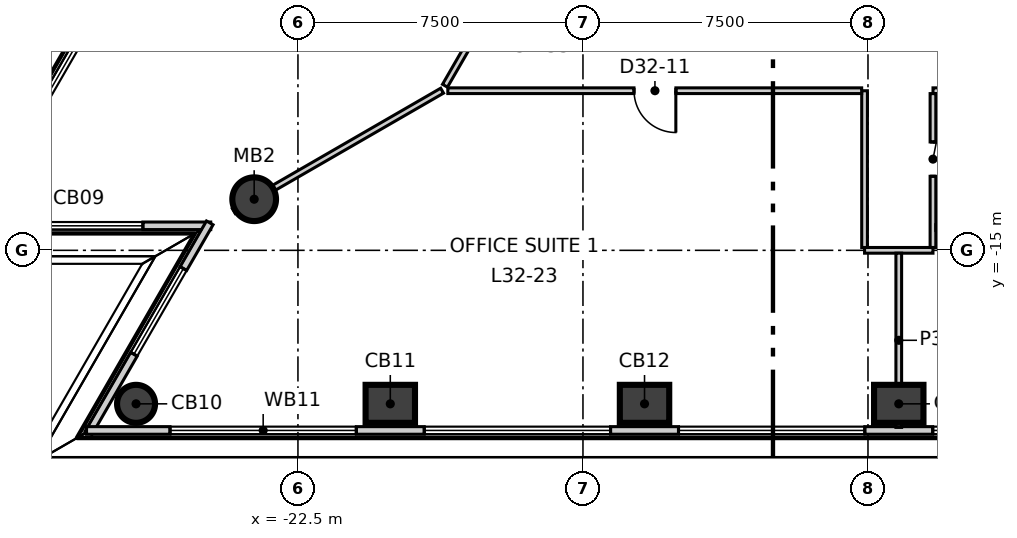
"""IFC4 building model, lengths in metres.
Left out: names, types, materials, properties, quantities, classifications, styles, units other than length and angle.
Written with IfcOpenShell. Run it as: python <this file> out.ifc"""

import sys

from ifc_helpers import new_model, si_unit, direction, frame, frame_2d, origin, origin_2d, place, context, subcontext, project, spatial, rectangle, circle, extrude, element, fill, save


model = new_model("IFC4")
c1 = context("Model", 3, precision=1e-05, world=origin(), true_north=direction((0.0, 1.0)))
c2 = subcontext(c1, "Body", "Model", "MODEL_VIEW")
j1 = project(units=[si_unit("LENGTHUNIT", "METRE"), si_unit("PLANEANGLEUNIT", "RADIAN")], contexts=[c1])
p1 = place(None, origin())
s1 = spatial("IfcSite", under=j1, at=p1, CompositionType="ELEMENT")
p2 = place(p1, origin())
s2 = spatial("IfcBuilding", under=s1, at=p2, CompositionType="ELEMENT")
p3 = place(p2, frame((0.0, 0.0, 140.3)))
s3 = spatial("IfcBuildingStorey", under=s2, at=p3, CompositionType="ELEMENT", Elevation=140.3)
p4 = place(p3, frame((-26.76, -19.039, -0.3), z_axis=(0.0, 0.0, 1.0), x_axis=(1.0, 0.0, 0.0)))
e1 = element("IfcColumn", 1, at=p4, inside=s3, PredefinedType="COLUMN", context=c2, shape_type="SweptSolid", body=[
    extrude(circle(Radius=0.5, at=origin_2d()), origin(), (0.0, 0.0, 1.0), 4.0),
])
for number, where, z_axis, x_axis in (
    (2, (-20.07, -19.039, -0.3), (0.0, 0.0, 1.0), (1.0, 0.0, 0.0)),
    (3, (-13.38, -19.039, -0.3), (0.0, 0.0, 1.0), (1.0, 0.0, 0.0)),
    (4, (-6.69, -19.039, -0.3), (0.0, 0.0, 1.0), (1.0, 0.0, 0.0)),
):
    element("IfcColumn", number, at=place(p3, frame(where, z_axis=z_axis, x_axis=x_axis)), inside=s3, PredefinedType="COLUMN", context=c2, shape_type="SweptSolid", body=[
        extrude(rectangle(XDim=1.3, YDim=1.0, at=origin_2d()), origin(), (0.0, 0.0, 1.0), 4.0),
    ])
p5 = place(p3, frame((-23.652, -13.655, -0.3), z_axis=(0.0, 0.0, 1.0), x_axis=(1.0, 0.0, 0.0)))
e5 = element("IfcColumn", 5, at=p5, inside=s3, PredefinedType="COLUMN", context=c2, shape_type="SweptSolid", body=[
    extrude(circle(Radius=0.575, at=origin_2d()), origin(), (0.0, 0.0, 1.0), 4.0),
])
p6 = place(p3, frame((-3.063, 34.172, 0.0), z_axis=(0.0, 0.0, 1.0), x_axis=(-0.500008098571, -0.866020728022, 0.0)))
e6 = element("IfcWall", 6, at=p6, inside=s3, PredefinedType="ELEMENTEDWALL", context=c2, shape_type="SweptSolid", body=[
    extrude(rectangle(XDim=56.105, YDim=0.2, at=frame_2d((28.052, 0.0))), origin(), (0.0, 0.0, 1.0), 3.7),
])
p7 = place(p6, frame((2.197, 0.0, 0.9)))
e7 = element("IfcOpeningElement", 7, at=p7, cuts=e6, PredefinedType="OPENING", context=c2, shape_type="SweptSolid", body=[
    extrude(rectangle(XDim=4.9, YDim=2.5, at=frame_2d((2.45, 1.25))), frame((0.0, 0.11, 0.0), z_axis=(0.0, -1.0, 0.0), x_axis=(1.0, 0.0, 0.0)), (0.0, 0.0, 1.0), 0.22),
])
p8 = place(p6, frame((8.887, 0.0, 0.9)))
e8 = element("IfcOpeningElement", 8, at=p8, cuts=e6, PredefinedType="OPENING", context=c2, shape_type="SweptSolid", body=[
    extrude(rectangle(XDim=4.9, YDim=2.5, at=frame_2d((2.45, 1.25))), frame((0.0, 0.11, 0.0), z_axis=(0.0, -1.0, 0.0), x_axis=(1.0, 0.0, 0.0)), (0.0, 0.0, 1.0), 0.22),
])
p9 = place(p6, frame((15.577, 0.0, 0.9)))
e9 = element("IfcOpeningElement", 9, at=p9, cuts=e6, PredefinedType="OPENING", context=c2, shape_type="SweptSolid", body=[
    extrude(rectangle(XDim=4.9, YDim=2.5, at=frame_2d((2.45, 1.25))), frame((0.0, 0.11, 0.0), z_axis=(0.0, -1.0, 0.0), x_axis=(1.0, 0.0, 0.0)), (0.0, 0.0, 1.0), 0.22),
])
p10 = place(p6, frame((22.267, 0.0, 0.9)))
e10 = element("IfcOpeningElement", 10, at=p10, cuts=e6, PredefinedType="OPENING", context=c2, shape_type="SweptSolid", body=[
    extrude(rectangle(XDim=4.9, YDim=2.5, at=frame_2d((2.45, 1.25))), frame((0.0, 0.11, 0.0), z_axis=(0.0, -1.0, 0.0), x_axis=(1.0, 0.0, 0.0)), (0.0, 0.0, 1.0), 0.22),
])
p11 = place(p6, frame((28.957, 0.0, 0.9)))
e11 = element("IfcOpeningElement", 11, at=p11, cuts=e6, PredefinedType="OPENING", context=c2, shape_type="SweptSolid", body=[
    extrude(rectangle(XDim=4.9, YDim=2.5, at=frame_2d((2.45, 1.25))), frame((0.0, 0.11, 0.0), z_axis=(0.0, -1.0, 0.0), x_axis=(1.0, 0.0, 0.0)), (0.0, 0.0, 1.0), 0.22),
])
p12 = place(p6, frame((35.647, 0.0, 0.9)))
e12 = element("IfcOpeningElement", 12, at=p12, cuts=e6, PredefinedType="OPENING", context=c2, shape_type="SweptSolid", body=[
    extrude(rectangle(XDim=4.9, YDim=2.5, at=frame_2d((2.45, 1.25))), frame((0.0, 0.11, 0.0), z_axis=(0.0, -1.0, 0.0), x_axis=(1.0, 0.0, 0.0)), (0.0, 0.0, 1.0), 0.22),
])
p13 = place(p6, frame((42.337, 0.0, 0.9)))
e13 = element("IfcOpeningElement", 13, at=p13, cuts=e6, PredefinedType="OPENING", context=c2, shape_type="SweptSolid", body=[
    extrude(rectangle(XDim=4.9, YDim=2.5, at=frame_2d((2.45, 1.25))), frame((0.0, 0.11, 0.0), z_axis=(0.0, -1.0, 0.0), x_axis=(1.0, 0.0, 0.0)), (0.0, 0.0, 1.0), 0.22),
])
p14 = place(p6, frame((49.027, 0.0, 0.9)))
e14 = element("IfcOpeningElement", 14, at=p14, cuts=e6, PredefinedType="OPENING", context=c2, shape_type="SweptSolid", body=[
    extrude(rectangle(XDim=4.9, YDim=2.5, at=frame_2d((2.45, 1.25))), frame((0.0, 0.11, 0.0), z_axis=(0.0, -1.0, 0.0), x_axis=(1.0, 0.0, 0.0)), (0.0, 0.0, 1.0), 0.22),
])
p15 = place(p3, frame((-31.171, -14.355, 0.0), z_axis=(0.0, 0.0, 1.0), x_axis=(1.0, 0.0, 0.0)))
e15 = element("IfcWall", 15, at=p15, inside=s3, PredefinedType="ELEMENTEDWALL", context=c2, shape_type="SweptSolid", body=[
    extrude(rectangle(XDim=6.376, YDim=0.2, at=frame_2d((3.188, 0.0))), origin(), (0.0, 0.0, 1.0), 3.7),
])
p16 = place(p15, frame((1.99, 0.0, 0.9)))
e16 = element("IfcOpeningElement", 16, at=p16, cuts=e15, PredefinedType="OPENING", context=c2, shape_type="SweptSolid", body=[
    extrude(rectangle(XDim=2.6, YDim=2.5, at=frame_2d((1.3, 1.25))), frame((0.0, 0.11, 0.0), z_axis=(0.0, -1.0, 0.0), x_axis=(1.0, 0.0, 0.0)), (0.0, 0.0, 1.0), 0.22),
])
p17 = place(p3, frame((-24.82, -14.277, 0.0), z_axis=(0.0, 0.0, 1.0), x_axis=(-0.499919089554, -0.866072112413, 0.0)))
e17 = element("IfcWall", 17, at=p17, inside=s3, PredefinedType="ELEMENTEDWALL", context=c2, shape_type="SweptSolid", body=[
    extrude(rectangle(XDim=6.377, YDim=0.2, at=frame_2d((3.188, 0.0))), origin(), (0.0, 0.0, 1.0), 3.7),
])
p18 = place(p17, frame((1.39, 0.0, 0.9)))
e18 = element("IfcOpeningElement", 18, at=p18, cuts=e17, PredefinedType="OPENING", context=c2, shape_type="SweptSolid", body=[
    extrude(rectangle(XDim=2.6, YDim=2.5, at=frame_2d((1.3, 1.25))), frame((0.0, 0.11, 0.0), z_axis=(0.0, -1.0, 0.0), x_axis=(1.0, 0.0, 0.0)), (0.0, 0.0, 1.0), 0.22),
])
p19 = place(p3, frame((-28.063, -19.739, 0.0), z_axis=(0.0, 0.0, 1.0), x_axis=(1.0, 0.0, 0.0)))
e19 = element("IfcWall", 19, at=p19, inside=s3, PredefinedType="ELEMENTEDWALL", context=c2, shape_type="SweptSolid", body=[
    extrude(rectangle(XDim=56.106, YDim=0.2, at=frame_2d((28.053, 0.0))), origin(), (0.0, 0.0, 1.0), 3.7),
])
p20 = place(p19, frame((2.198, 0.0, 0.9)))
e20 = element("IfcOpeningElement", 20, at=p20, cuts=e19, PredefinedType="OPENING", context=c2, shape_type="SweptSolid", body=[
    extrude(rectangle(XDim=4.9, YDim=2.5, at=frame_2d((2.45, 1.25))), frame((0.0, 0.11, 0.0), z_axis=(0.0, -1.0, 0.0), x_axis=(1.0, 0.0, 0.0)), (0.0, 0.0, 1.0), 0.22),
])
p21 = place(p19, frame((8.888, 0.0, 0.9)))
e21 = element("IfcOpeningElement", 21, at=p21, cuts=e19, PredefinedType="OPENING", context=c2, shape_type="SweptSolid", body=[
    extrude(rectangle(XDim=4.9, YDim=2.5, at=frame_2d((2.45, 1.25))), frame((0.0, 0.11, 0.0), z_axis=(0.0, -1.0, 0.0), x_axis=(1.0, 0.0, 0.0)), (0.0, 0.0, 1.0), 0.22),
])
p22 = place(p19, frame((15.578, 0.0, 0.9)))
e22 = element("IfcOpeningElement", 22, at=p22, cuts=e19, PredefinedType="OPENING", context=c2, shape_type="SweptSolid", body=[
    extrude(rectangle(XDim=4.9, YDim=2.5, at=frame_2d((2.45, 1.25))), frame((0.0, 0.11, 0.0), z_axis=(0.0, -1.0, 0.0), x_axis=(1.0, 0.0, 0.0)), (0.0, 0.0, 1.0), 0.22),
])
p23 = place(p19, frame((22.268, 0.0, 0.9)))
e23 = element("IfcOpeningElement", 23, at=p23, cuts=e19, PredefinedType="OPENING", context=c2, shape_type="SweptSolid", body=[
    extrude(rectangle(XDim=4.9, YDim=2.5, at=frame_2d((2.45, 1.25))), frame((0.0, 0.11, 0.0), z_axis=(0.0, -1.0, 0.0), x_axis=(1.0, 0.0, 0.0)), (0.0, 0.0, 1.0), 0.22),
])
p24 = place(p19, frame((28.958, 0.0, 0.9)))
e24 = element("IfcOpeningElement", 24, at=p24, cuts=e19, PredefinedType="OPENING", context=c2, shape_type="SweptSolid", body=[
    extrude(rectangle(XDim=4.9, YDim=2.5, at=frame_2d((2.45, 1.25))), frame((0.0, 0.11, 0.0), z_axis=(0.0, -1.0, 0.0), x_axis=(1.0, 0.0, 0.0)), (0.0, 0.0, 1.0), 0.22),
])
p25 = place(p19, frame((35.648, 0.0, 0.9)))
e25 = element("IfcOpeningElement", 25, at=p25, cuts=e19, PredefinedType="OPENING", context=c2, shape_type="SweptSolid", body=[
    extrude(rectangle(XDim=4.9, YDim=2.5, at=frame_2d((2.45, 1.25))), frame((0.0, 0.11, 0.0), z_axis=(0.0, -1.0, 0.0), x_axis=(1.0, 0.0, 0.0)), (0.0, 0.0, 1.0), 0.22),
])
p26 = place(p19, frame((42.338, 0.0, 0.9)))
e26 = element("IfcOpeningElement", 26, at=p26, cuts=e19, PredefinedType="OPENING", context=c2, shape_type="SweptSolid", body=[
    extrude(rectangle(XDim=4.9, YDim=2.5, at=frame_2d((2.45, 1.25))), frame((0.0, 0.11, 0.0), z_axis=(0.0, -1.0, 0.0), x_axis=(1.0, 0.0, 0.0)), (0.0, 0.0, 1.0), 0.22),
])
p27 = place(p19, frame((49.028, 0.0, 0.9)))
e27 = element("IfcOpeningElement", 27, at=p27, cuts=e19, PredefinedType="OPENING", context=c2, shape_type="SweptSolid", body=[
    extrude(rectangle(XDim=4.9, YDim=2.5, at=frame_2d((2.45, 1.25))), frame((0.0, 0.11, 0.0), z_axis=(0.0, -1.0, 0.0), x_axis=(1.0, 0.0, 0.0)), (0.0, 0.0, 1.0), 0.22),
])
p28 = place(p3, frame((-24.189, -13.965, 0.0), z_axis=(0.0, 0.0, 1.0), x_axis=(0.865994217434, 0.500054012454, 0.0)))
e28 = element("IfcWall", 28, at=p28, inside=s3, PredefinedType="PARTITIONING", context=c2, shape_type="SweptSolid", body=[
    extrude(rectangle(XDim=6.331, YDim=0.15, at=frame_2d((3.166, 0.0))), origin(), (0.0, 0.0, 1.0), 3.15),
])
p29 = place(p3, frame((-7.59, -15.0, 0.0), z_axis=(0.0, 0.0, 1.0), x_axis=(1.0, 0.0, 0.0)))
e29 = element("IfcWall", 29, at=p29, inside=s3, PredefinedType="PARTITIONING", context=c2, shape_type="SweptSolid", body=[
    extrude(rectangle(XDim=1.8, YDim=0.15, at=frame_2d((0.9, 0.0))), origin(), (0.0, 0.0, 1.0), 3.7),
])
p30 = place(p3, frame((-7.59, -14.925, 0.0), z_axis=(0.0, 0.0, 1.0), x_axis=(0.0, 1.0, 0.0)))
e30 = element("IfcWall", 30, at=p30, inside=s3, PredefinedType="PARTITIONING", context=c2, shape_type="SweptSolid", body=[
    extrude(rectangle(XDim=4.124, YDim=0.15, at=frame_2d((2.062, 0.0))), origin(), (0.0, 0.0, 1.0), 3.7),
])
p31 = place(p3, frame((-18.556, -10.8, 0.0), z_axis=(0.0, 0.0, 1.0), x_axis=(1.0, 0.0, 0.0)))
e31 = element("IfcWall", 31, at=p31, inside=s3, PredefinedType="PARTITIONING", context=c2, shape_type="SweptSolid", body=[
    extrude(rectangle(XDim=10.89, YDim=0.15, at=frame_2d((5.445, 0.0))), origin(), (0.0, 0.0, 1.0), 3.7),
])
p32 = place(p31, frame((4.9, 0.0, 0.0)))
e32 = element("IfcOpeningElement", 32, at=p32, cuts=e31, PredefinedType="OPENING", context=c2, shape_type="SweptSolid", body=[
    extrude(rectangle(XDim=1.1, YDim=2.1, at=frame_2d((0.55, 1.05))), frame((0.0, 0.085, 0.0), z_axis=(0.0, -1.0, 0.0), x_axis=(1.0, 0.0, 0.0)), (0.0, 0.0, 1.0), 0.17),
])
p33 = place(p3, frame((-5.789, -10.8, 0.0), z_axis=(0.0, 0.0, 1.0), x_axis=(1.0, 0.0, 0.0)))
e33 = element("IfcWall", 33, at=p33, inside=s3, PredefinedType="PARTITIONING", context=c2, shape_type="SweptSolid", body=[
    extrude(rectangle(XDim=24.495, YDim=0.15, at=frame_2d((12.248, 0.0))), origin(), (0.0, 0.0, 1.0), 3.7),
])
p34 = place(p33, frame((10.049, 0.0, 0.0)))
e34 = element("IfcOpeningElement", 34, at=p34, cuts=e33, PredefinedType="OPENING", context=c2, shape_type="SweptSolid", body=[
    extrude(rectangle(XDim=1.1, YDim=2.1, at=frame_2d((0.55, 1.05))), frame((0.0, 0.085, 0.0), z_axis=(0.0, -1.0, 0.0), x_axis=(1.0, 0.0, 0.0)), (0.0, 0.0, 1.0), 0.17),
])
p35 = place(p33, frame((4.349, 0.0, 0.0)))
e35 = element("IfcOpeningElement", 35, at=p35, cuts=e33, PredefinedType="OPENING", context=c2, shape_type="SweptSolid", body=[
    extrude(rectangle(XDim=0.9, YDim=2.1, at=frame_2d((0.45, 1.05))), frame((0.0, 0.085, 0.0), z_axis=(0.0, -1.0, 0.0), x_axis=(1.0, 0.0, 0.0)), (0.0, 0.0, 1.0), 0.17),
])
p36 = place(p33, frame((7.149, 0.0, 0.0)))
e36 = element("IfcOpeningElement", 36, at=p36, cuts=e33, PredefinedType="OPENING", context=c2, shape_type="SweptSolid", body=[
    extrude(rectangle(XDim=1.0, YDim=2.1, at=frame_2d((0.5, 1.05))), frame((0.0, 0.085, 0.0), z_axis=(0.0, -1.0, 0.0), x_axis=(1.0, 0.0, 0.0)), (0.0, 0.0, 1.0), 0.17),
])
p37 = place(p33, frame((17.929, 0.0, 0.0)))
e37 = element("IfcOpeningElement", 37, at=p37, cuts=e33, PredefinedType="OPENING", context=c2, shape_type="SweptSolid", body=[
    extrude(rectangle(XDim=1.1, YDim=2.1, at=frame_2d((0.55, 1.05))), frame((0.0, 0.085, 0.0), z_axis=(0.0, -1.0, 0.0), x_axis=(1.0, 0.0, 0.0)), (0.0, 0.0, 1.0), 0.17),
])
p38 = place(p3, frame((-18.631, -10.669, 0.0), z_axis=(0.0, 0.0, 1.0), x_axis=(0.50004165882, 0.866001350717, 0.0)))
e38 = element("IfcWall", 38, at=p38, inside=s3, PredefinedType="PARTITIONING", context=c2, shape_type="SweptSolid", body=[
    extrude(rectangle(XDim=17.655, YDim=0.15, at=frame_2d((8.827, 0.0))), origin(), (0.0, 0.0, 1.0), 3.7),
])
p39 = place(p38, frame((10.206, 0.0, 0.0)))
e39 = element("IfcOpeningElement", 39, at=p39, cuts=e38, PredefinedType="OPENING", context=c2, shape_type="SweptSolid", body=[
    extrude(rectangle(XDim=1.1, YDim=2.1, at=frame_2d((0.55, 1.05))), frame((0.0, 0.085, 0.0), z_axis=(0.0, -1.0, 0.0), x_axis=(1.0, 0.0, 0.0)), (0.0, 0.0, 1.0), 0.17),
])
p40 = place(p38, frame((12.406, 0.0, 0.0)))
e40 = element("IfcOpeningElement", 40, at=p40, cuts=e38, PredefinedType="OPENING", context=c2, shape_type="SweptSolid", body=[
    extrude(rectangle(XDim=0.9, YDim=2.1, at=frame_2d((0.45, 1.05))), frame((0.0, 0.085, 0.0), z_axis=(0.0, -1.0, 0.0), x_axis=(1.0, 0.0, 0.0)), (0.0, 0.0, 1.0), 0.17),
])
p41 = place(p38, frame((1.925, 0.0, 0.0)))
e41 = element("IfcOpeningElement", 41, at=p41, cuts=e38, PredefinedType="OPENING", context=c2, shape_type="SweptSolid", body=[
    extrude(rectangle(XDim=1.1, YDim=2.1, at=frame_2d((0.55, 1.05))), frame((0.0, 0.085, 0.0), z_axis=(0.0, -1.0, 0.0), x_axis=(1.0, 0.0, 0.0)), (0.0, 0.0, 1.0), 0.17),
])
p42 = place(p3, frame((-6.69, -19.659, 0.0), z_axis=(0.0, 0.0, 1.0), x_axis=(0.0, 1.0, 0.0)))
e42 = element("IfcWall", 42, at=p42, inside=s3, PredefinedType="PARTITIONING", context=c2, shape_type="SweptSolid", body=[
    extrude(rectangle(XDim=4.584, YDim=0.15, at=frame_2d((2.292, 0.0))), origin(), (0.0, 0.0, 1.0), 3.7),
])
p43 = place(p3, frame((-5.79, -14.925, 0.0), z_axis=(0.0, 0.0, 1.0), x_axis=(0.0, 1.0, 0.0)))
e43 = element("IfcWall", 43, at=p43, inside=s3, PredefinedType="PARTITIONING", context=c2, shape_type="SweptSolid", body=[
    extrude(rectangle(XDim=4.049, YDim=0.15, at=frame_2d((2.024, 0.0))), origin(), (0.0, 0.0, 1.0), 3.7),
])
p44 = place(p43, frame((1.875, 0.0, 0.0)))
e44 = element("IfcOpeningElement", 44, at=p44, cuts=e43, PredefinedType="OPENING", context=c2, shape_type="SweptSolid", body=[
    extrude(rectangle(XDim=0.9, YDim=2.1, at=frame_2d((0.45, 1.05))), frame((0.0, 0.085, 0.0), z_axis=(0.0, -1.0, 0.0), x_axis=(1.0, 0.0, 0.0)), (0.0, 0.0, 1.0), 0.17),
])
p45 = place(p3, frame((-5.715, -14.4, 0.0), z_axis=(0.0, 0.0, 1.0), x_axis=(1.0, 0.0, 0.0)))
e45 = element("IfcWall", 45, at=p45, inside=s3, PredefinedType="PARTITIONING", context=c2, shape_type="SweptSolid", body=[
    extrude(rectangle(XDim=8.725, YDim=0.15, at=frame_2d((4.363, 0.0))), origin(), (0.0, 0.0, 1.0), 3.7),
])
p46 = place(p14, origin())
e46 = element("IfcWindow", 46, at=p46, inside=s3, PartitioningType="SINGLE_PANEL", PredefinedType="WINDOW", context=c2, shape_type="SweptSolid", body=[
    extrude(rectangle(XDim=4.9, YDim=2.5, at=frame_2d((2.45, 1.25))), frame((0.0, 0.03, 0.0), z_axis=(0.0, -1.0, 0.0), x_axis=(1.0, 0.0, 0.0)), (0.0, 0.0, 1.0), 0.06),
])
fill(e14, e46)
p47 = place(p16, origin())
e47 = element("IfcWindow", 47, at=p47, inside=s3, PartitioningType="SINGLE_PANEL", PredefinedType="WINDOW", context=c2, shape_type="SweptSolid", body=[
    extrude(rectangle(XDim=2.6, YDim=2.5, at=frame_2d((1.3, 1.25))), frame((0.0, 0.03, 0.0), z_axis=(0.0, -1.0, 0.0), x_axis=(1.0, 0.0, 0.0)), (0.0, 0.0, 1.0), 0.06),
])
fill(e16, e47)
p48 = place(p18, origin())
e48 = element("IfcWindow", 48, at=p48, inside=s3, PartitioningType="SINGLE_PANEL", PredefinedType="WINDOW", context=c2, shape_type="SweptSolid", body=[
    extrude(rectangle(XDim=2.6, YDim=2.5, at=frame_2d((1.3, 1.25))), frame((0.0, 0.03, 0.0), z_axis=(0.0, -1.0, 0.0), x_axis=(1.0, 0.0, 0.0)), (0.0, 0.0, 1.0), 0.06),
])
fill(e18, e48)
p49 = place(p20, origin())
e49 = element("IfcWindow", 49, at=p49, inside=s3, PartitioningType="SINGLE_PANEL", PredefinedType="WINDOW", context=c2, shape_type="SweptSolid", body=[
    extrude(rectangle(XDim=4.9, YDim=2.5, at=frame_2d((2.45, 1.25))), frame((0.0, 0.03, 0.0), z_axis=(0.0, -1.0, 0.0), x_axis=(1.0, 0.0, 0.0)), (0.0, 0.0, 1.0), 0.06),
])
fill(e20, e49)
p50 = place(p21, origin())
e50 = element("IfcWindow", 50, at=p50, inside=s3, PartitioningType="SINGLE_PANEL", PredefinedType="WINDOW", context=c2, shape_type="SweptSolid", body=[
    extrude(rectangle(XDim=4.9, YDim=2.5, at=frame_2d((2.45, 1.25))), frame((0.0, 0.03, 0.0), z_axis=(0.0, -1.0, 0.0), x_axis=(1.0, 0.0, 0.0)), (0.0, 0.0, 1.0), 0.06),
])
fill(e21, e50)
p51 = place(p22, origin())
e51 = element("IfcWindow", 51, at=p51, inside=s3, PartitioningType="SINGLE_PANEL", PredefinedType="WINDOW", context=c2, shape_type="SweptSolid", body=[
    extrude(rectangle(XDim=4.9, YDim=2.5, at=frame_2d((2.45, 1.25))), frame((0.0, 0.03, 0.0), z_axis=(0.0, -1.0, 0.0), x_axis=(1.0, 0.0, 0.0)), (0.0, 0.0, 1.0), 0.06),
])
fill(e22, e51)
p52 = place(p23, origin())
e52 = element("IfcWindow", 52, at=p52, inside=s3, PartitioningType="SINGLE_PANEL", PredefinedType="WINDOW", context=c2, shape_type="SweptSolid", body=[
    extrude(rectangle(XDim=4.9, YDim=2.5, at=frame_2d((2.45, 1.25))), frame((0.0, 0.03, 0.0), z_axis=(0.0, -1.0, 0.0), x_axis=(1.0, 0.0, 0.0)), (0.0, 0.0, 1.0), 0.06),
])
fill(e23, e52)
p53 = place(p32, origin())
e53 = element("IfcDoor", 53, at=p53, inside=s3, OperationType="SINGLE_SWING_RIGHT", PredefinedType="DOOR", context=c2, shape_type="SweptSolid", body=[
    extrude(rectangle(XDim=1.1, YDim=2.1, at=frame_2d((0.55, 1.05))), frame((0.0, 0.025, 0.0), z_axis=(0.0, -1.0, 0.0), x_axis=(1.0, 0.0, 0.0)), (0.0, 0.0, 1.0), 0.05),
])
fill(e32, e53)
p54 = place(p44, origin())
e54 = element("IfcDoor", 54, at=p54, inside=s3, OperationType="SINGLE_SWING_RIGHT", PredefinedType="DOOR", context=c2, shape_type="SweptSolid", body=[
    extrude(rectangle(XDim=0.9, YDim=2.1, at=frame_2d((0.45, 1.05))), frame((0.0, 0.025, 0.0), z_axis=(0.0, -1.0, 0.0), x_axis=(1.0, 0.0, 0.0)), (0.0, 0.0, 1.0), 0.05),
])
fill(e44, e54)
save(model, sys.argv[1])
